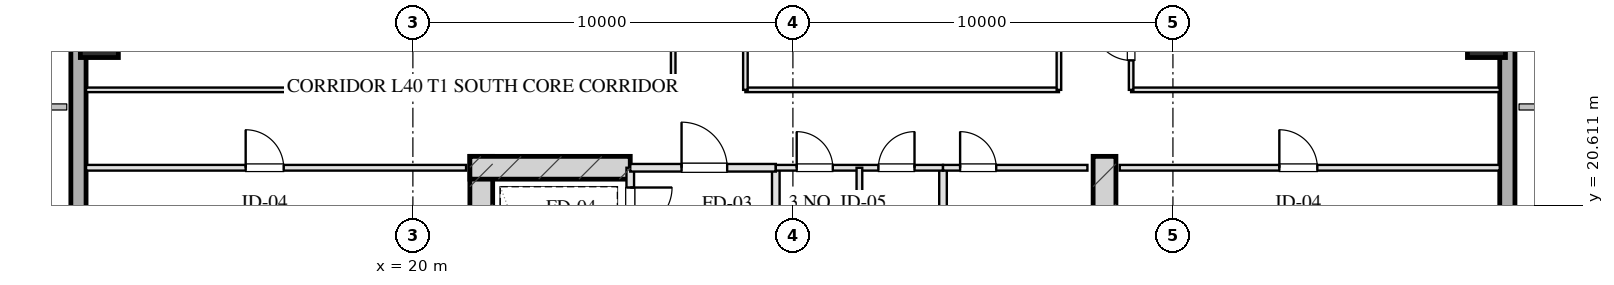
"""IFC4 building model, lengths in metres.
Left out: names, types, materials, properties, quantities, classifications, styles, units other than length and angle.
Written with IfcOpenShell. Run it as: python <this file> out.ifc"""

import sys

from ifc_helpers import new_model, si_unit, direction, frame, frame_2d, origin, origin_2d, place, context, subcontext, project, spatial, rectangle, hollow_rectangle, extrude, element, fill, save


model = new_model("IFC4")
c1 = context("Model", 3, precision=1e-05, world=origin(), true_north=direction((0.0, 1.0)))
c2 = subcontext(c1, "Body", "Model", "MODEL_VIEW")
j1 = project(units=[si_unit("LENGTHUNIT", "METRE"), si_unit("PLANEANGLEUNIT", "RADIAN")], contexts=[c1])
p1 = place(None, origin())
s1 = spatial("IfcSite", under=j1, at=p1, CompositionType="ELEMENT")
p2 = place(p1, origin())
s2 = spatial("IfcBuilding", under=s1, at=p2, CompositionType="ELEMENT")
p3 = place(p2, frame((0.0, 0.0, 152.95)))
s3 = spatial("IfcBuildingStorey", under=s2, at=p3, CompositionType="ELEMENT", Elevation=152.95)
for number, where, z_axis, x_axis in (
    (1, (21.8, 21.9, 0.0), (0.0, 0.0, 1.0), (0.0, -1.0, 0.0)),
    (2, (38.2, 21.9, 0.0), (0.0, 0.0, 1.0), (0.0, -1.0, 0.0)),
):
    element("IfcWall", number, at=place(p3, frame(where, z_axis=z_axis, x_axis=x_axis)), inside=s3, PredefinedType="SHEAR", context=c2, shape_type="SweptSolid", body=[
        extrude(rectangle(XDim=9.48, YDim=0.6, at=frame_2d((4.74, 0.0))), origin(), (0.0, 0.0, 1.0), 3.45),
    ])
p4 = place(p3, frame((21.5, 21.6, 0.0), z_axis=(0.0, 0.0, 1.0), x_axis=(1.0, 0.0, 0.0)))
e3 = element("IfcWall", 3, at=p4, inside=s3, PredefinedType="SHEAR", context=c2, shape_type="SweptSolid", body=[
    extrude(rectangle(XDim=4.22, YDim=0.6, at=frame_2d((2.11, 0.0))), origin(), (0.0, 0.0, 1.0), 3.45),
])
for number, where, z_axis, x_axis in (
    (4, (11.75, 25.0, 0.0), (0.0, 0.0, 1.0), (1.0, 0.0, 0.0)),
    (5, (48.25, 25.0, 0.0), (0.0, 0.0, 1.0), (1.0, 0.0, 0.0)),
):
    element("IfcColumn", number, at=place(p3, frame(where, z_axis=z_axis, x_axis=x_axis)), inside=s3, PredefinedType="COLUMN", context=c2, shape_type="SweptSolid", body=[
        extrude(hollow_rectangle(XDim=1.0, YDim=1.0, WallThickness=0.036, at=origin_2d()), origin(), (0.0, 0.0, 1.0), 3.451),
    ])
p5 = place(p3, frame((11.2, 9.0, 0.0), z_axis=(0.0, 0.0, 1.0), x_axis=(0.0, 1.0, 0.0)))
e6 = element("IfcWall", 6, at=p5, inside=s3, PredefinedType="SOLIDWALL", context=c2, shape_type="SweptSolid", body=[
    extrude(rectangle(XDim=50.0, YDim=0.4, at=frame_2d((25.0, 0.0))), origin(), (0.0, 0.0, 1.0), 2.61),
])
p6 = place(p5, frame((30.275, 0.0, 0.75)))
e7 = element("IfcOpeningElement", 7, at=p6, cuts=e6, PredefinedType="OPENING", context=c2, shape_type="SweptSolid", body=[
    extrude(rectangle(XDim=2.25, YDim=1.46, at=frame_2d((1.125, 0.73))), frame((0.0, 0.21, 0.0), z_axis=(0.0, -1.0, 0.0), x_axis=(1.0, 0.0, 0.0)), (0.0, 0.0, 1.0), 0.42),
])
p7 = place(p5, frame((18.65, 0.0, 0.0)))
e8 = element("IfcOpeningElement", 8, at=p7, cuts=e6, PredefinedType="OPENING", context=c2, shape_type="SweptSolid", body=[
    extrude(rectangle(XDim=1.1, YDim=2.15, at=frame_2d((0.55, 1.075))), frame((0.0, 0.21, 0.0), z_axis=(0.0, -1.0, 0.0), x_axis=(1.0, 0.0, 0.0)), (0.0, 0.0, 1.0), 0.42),
])
p8 = place(p3, frame((48.8, 59.0, 0.0), z_axis=(0.0, 0.0, 1.0), x_axis=(0.0, -1.0, 0.0)))
e9 = element("IfcWall", 9, at=p8, inside=s3, PredefinedType="SOLIDWALL", context=c2, shape_type="SweptSolid", body=[
    extrude(rectangle(XDim=50.0, YDim=0.4, at=frame_2d((25.0, 0.0))), origin(), (0.0, 0.0, 1.0), 2.61),
])
p9 = place(p8, frame((30.25, 0.0, 0.0)))
e10 = element("IfcOpeningElement", 10, at=p9, cuts=e9, PredefinedType="OPENING", context=c2, shape_type="SweptSolid", body=[
    extrude(rectangle(XDim=1.1, YDim=2.15, at=frame_2d((0.55, 1.075))), frame((0.0, 0.21, 0.0), z_axis=(0.0, -1.0, 0.0), x_axis=(1.0, 0.0, 0.0)), (0.0, 0.0, 1.0), 0.42),
])
p10 = place(p3, frame((25.72, 21.6, 0.0), z_axis=(0.0, 0.0, 1.0), x_axis=(0.0, -1.0, 0.0)))
e11 = element("IfcWall", 11, at=p10, inside=s3, PredefinedType="PARTITIONING", context=c2, shape_type="SweptSolid", body=[
    extrude(rectangle(XDim=1.9, YDim=0.2, at=frame_2d((0.95, 0.0))), origin(), (0.0, 0.0, 1.0), 3.175),
])
p11 = place(p10, frame((0.52, 0.0, 0.0)))
e12 = element("IfcOpeningElement", 12, at=p11, cuts=e11, PredefinedType="OPENING", context=c2, shape_type="SweptSolid", body=[
    extrude(rectangle(XDim=1.1, YDim=2.05, at=frame_2d((0.55, 1.025))), frame((0.0, 0.11, 0.0), z_axis=(0.0, -1.0, 0.0), x_axis=(1.0, 0.0, 0.0)), (0.0, 0.0, 1.0), 0.22),
])
p12 = place(p3, frame((29.55, 21.6, 0.0), z_axis=(0.0, 0.0, 1.0), x_axis=(0.0, -1.0, 0.0)))
e13 = element("IfcWall", 13, at=p12, inside=s3, PredefinedType="PARTITIONING", context=c2, shape_type="SweptSolid", body=[
    extrude(rectangle(XDim=8.43, YDim=0.2, at=frame_2d((4.215, 0.0))), origin(), (0.0, 0.0, 1.0), 3.175),
])
p13 = place(p3, frame((25.72, 21.6, 0.0), z_axis=(0.0, 0.0, 1.0), x_axis=(1.0, 0.0, 0.0)))
e14 = element("IfcWall", 14, at=p13, inside=s3, PredefinedType="PARTITIONING", context=c2, shape_type="SweptSolid", body=[
    extrude(rectangle(XDim=3.83, YDim=0.2, at=frame_2d((1.915, 0.0))), origin(), (0.0, 0.0, 1.0), 3.175),
])
p14 = place(p13, frame((1.35, 0.0, 0.0)))
e15 = element("IfcOpeningElement", 15, at=p14, cuts=e14, PredefinedType="OPENING", context=c2, shape_type="SweptSolid", body=[
    extrude(rectangle(XDim=1.2, YDim=2.05, at=frame_2d((0.6, 1.025))), frame((0.0, 0.11, 0.0), z_axis=(0.0, -1.0, 0.0), x_axis=(1.0, 0.0, 0.0)), (0.0, 0.0, 1.0), 0.22),
])
p15 = place(p3, frame((33.95, 21.6, 0.0), z_axis=(0.0, 0.0, 1.0), x_axis=(0.0, -1.0, 0.0)))
e16 = element("IfcWall", 16, at=p15, inside=s3, PredefinedType="PARTITIONING", context=c2, shape_type="SweptSolid", body=[
    extrude(rectangle(XDim=8.43, YDim=0.2, at=frame_2d((4.215, 0.0))), origin(), (0.0, 0.0, 1.0), 3.175),
])
p16 = place(p3, frame((29.55, 21.6, 0.0), z_axis=(0.0, 0.0, 1.0), x_axis=(1.0, 0.0, 0.0)))
e17 = element("IfcWall", 17, at=p16, inside=s3, PredefinedType="PARTITIONING", context=c2, shape_type="SweptSolid", body=[
    extrude(rectangle(XDim=4.4, YDim=0.15, at=frame_2d((2.2, 0.0))), origin(), (0.0, 0.0, 1.0), 3.175),
])
p17 = place(p16, frame((0.55, 0.0, 0.0)))
e18 = element("IfcOpeningElement", 18, at=p17, cuts=e17, PredefinedType="OPENING", context=c2, shape_type="SweptSolid", body=[
    extrude(rectangle(XDim=0.95, YDim=2.05, at=frame_2d((0.475, 1.025))), frame((0.0, 0.085, 0.0), z_axis=(0.0, -1.0, 0.0), x_axis=(1.0, 0.0, 0.0)), (0.0, 0.0, 1.0), 0.17),
])
p18 = place(p16, frame((2.7, 0.0, 0.0)))
e19 = element("IfcOpeningElement", 19, at=p18, cuts=e17, PredefinedType="OPENING", context=c2, shape_type="SweptSolid", body=[
    extrude(rectangle(XDim=0.95, YDim=2.05, at=frame_2d((0.475, 1.025))), frame((0.0, 0.085, 0.0), z_axis=(0.0, -1.0, 0.0), x_axis=(1.0, 0.0, 0.0)), (0.0, 0.0, 1.0), 0.17),
])
p19 = place(p3, frame((31.75, 21.6, 0.0), z_axis=(0.0, 0.0, 1.0), x_axis=(0.0, -1.0, 0.0)))
e20 = element("IfcWall", 20, at=p19, inside=s3, PredefinedType="PARTITIONING", context=c2, shape_type="SweptSolid", body=[
    extrude(rectangle(XDim=8.43, YDim=0.15, at=frame_2d((4.215, 0.0))), origin(), (0.0, 0.0, 1.0), 3.175),
])
p20 = place(p3, frame((33.95, 21.6, 0.0), z_axis=(0.0, 0.0, 1.0), x_axis=(1.0, 0.0, 0.0)))
e21 = element("IfcWall", 21, at=p20, inside=s3, PredefinedType="PARTITIONING", context=c2, shape_type="SweptSolid", body=[
    extrude(rectangle(XDim=3.8, YDim=0.15, at=frame_2d((1.9, 0.0))), origin(), (0.0, 0.0, 1.0), 3.175),
])
p21 = place(p20, frame((0.45, 0.0, 0.0)))
e22 = element("IfcOpeningElement", 22, at=p21, cuts=e21, PredefinedType="OPENING", context=c2, shape_type="SweptSolid", body=[
    extrude(rectangle(XDim=0.95, YDim=2.05, at=frame_2d((0.475, 1.025))), frame((0.0, 0.085, 0.0), z_axis=(0.0, -1.0, 0.0), x_axis=(1.0, 0.0, 0.0)), (0.0, 0.0, 1.0), 0.17),
])
p22 = place(p3, frame((11.4, 21.6, 0.0), z_axis=(0.0, 0.0, 1.0), x_axis=(1.0, 0.0, 0.0)))
e23 = element("IfcWall", 23, at=p22, inside=s3, PredefinedType="PARTITIONING", context=c2, shape_type="SweptSolid", body=[
    extrude(rectangle(XDim=10.0, YDim=0.15, at=frame_2d((5.0, 0.0))), origin(), (0.0, 0.0, 1.0), 3.175),
])
p23 = place(p22, frame((4.2, 0.0, 0.0)))
e24 = element("IfcOpeningElement", 24, at=p23, cuts=e23, PredefinedType="OPENING", context=c2, shape_type="SweptSolid", body=[
    extrude(rectangle(XDim=1.0, YDim=2.05, at=frame_2d((0.5, 1.025))), frame((0.0, 0.085, 0.0), z_axis=(0.0, -1.0, 0.0), x_axis=(1.0, 0.0, 0.0)), (0.0, 0.0, 1.0), 0.17),
])
p24 = place(p3, frame((38.6, 21.6, 0.0), z_axis=(0.0, 0.0, 1.0), x_axis=(1.0, 0.0, 0.0)))
e25 = element("IfcWall", 25, at=p24, inside=s3, PredefinedType="PARTITIONING", context=c2, shape_type="SweptSolid", body=[
    extrude(rectangle(XDim=10.0, YDim=0.15, at=frame_2d((5.0, 0.0))), origin(), (0.0, 0.0, 1.0), 3.175),
])
p25 = place(p24, frame((4.2, 0.0, 0.0)))
e26 = element("IfcOpeningElement", 26, at=p25, cuts=e25, PredefinedType="OPENING", context=c2, shape_type="SweptSolid", body=[
    extrude(rectangle(XDim=1.0, YDim=2.05, at=frame_2d((0.5, 1.025))), frame((0.0, 0.085, 0.0), z_axis=(0.0, -1.0, 0.0), x_axis=(1.0, 0.0, 0.0)), (0.0, 0.0, 1.0), 0.17),
])
p26 = place(p3, frame((11.4, 23.65, 0.0), z_axis=(0.0, 0.0, 1.0), x_axis=(1.0, 0.0, 0.0)))
e27 = element("IfcWall", 27, at=p26, inside=s3, PredefinedType="PARTITIONING", context=c2, shape_type="SweptSolid", body=[
    extrude(rectangle(XDim=15.45, YDim=0.12, at=frame_2d((7.725, 0.0))), origin(), (0.0, 0.0, 1.0), 3.175),
])
p27 = place(p3, frame((28.75, 23.65, 0.0), z_axis=(0.0, 0.0, 1.0), x_axis=(1.0, 0.0, 0.0)))
e28 = element("IfcWall", 28, at=p27, inside=s3, PredefinedType="PARTITIONING", context=c2, shape_type="SweptSolid", body=[
    extrude(rectangle(XDim=8.25, YDim=0.12, at=frame_2d((4.125, 0.0))), origin(), (0.0, 0.0, 1.0), 3.175),
])
p28 = place(p3, frame((38.9, 23.65, 0.0), z_axis=(0.0, 0.0, 1.0), x_axis=(1.0, 0.0, 0.0)))
e29 = element("IfcWall", 29, at=p28, inside=s3, PredefinedType="PARTITIONING", context=c2, shape_type="SweptSolid", body=[
    extrude(rectangle(XDim=9.7, YDim=0.12, at=frame_2d((4.85, 0.0))), origin(), (0.0, 0.0, 1.0), 3.175),
])
p29 = place(p3, frame((26.85, 23.65, 0.0), z_axis=(0.0, 0.0, 1.0), x_axis=(0.0, 1.0, 0.0)))
e30 = element("IfcWall", 30, at=p29, inside=s3, PredefinedType="PARTITIONING", context=c2, shape_type="SweptSolid", body=[
    extrude(rectangle(XDim=20.7, YDim=0.12, at=frame_2d((10.35, 0.0))), origin(), (0.0, 0.0, 1.0), 3.175),
])
p30 = place(p29, frame((2.675, 0.0, 0.0)))
e31 = element("IfcOpeningElement", 31, at=p30, cuts=e30, PredefinedType="OPENING", context=c2, shape_type="SweptSolid", body=[
    extrude(rectangle(XDim=1.0, YDim=2.05, at=frame_2d((0.5, 1.025))), frame((0.0, 0.07, 0.0), z_axis=(0.0, -1.0, 0.0), x_axis=(1.0, 0.0, 0.0)), (0.0, 0.0, 1.0), 0.14),
])
p31 = place(p29, frame((9.85, 0.0, 0.0)))
e32 = element("IfcOpeningElement", 32, at=p31, cuts=e30, PredefinedType="OPENING", context=c2, shape_type="SweptSolid", body=[
    extrude(rectangle(XDim=1.05, YDim=2.05, at=frame_2d((0.525, 1.025))), frame((0.0, 0.07, 0.0), z_axis=(0.0, -1.0, 0.0), x_axis=(1.0, 0.0, 0.0)), (0.0, 0.0, 1.0), 0.14),
])
p32 = place(p29, frame((17.025, 0.0, 0.0)))
e33 = element("IfcOpeningElement", 33, at=p32, cuts=e30, PredefinedType="OPENING", context=c2, shape_type="SweptSolid", body=[
    extrude(rectangle(XDim=1.0, YDim=2.05, at=frame_2d((0.5, 1.025))), frame((0.0, 0.07, 0.0), z_axis=(0.0, -1.0, 0.0), x_axis=(1.0, 0.0, 0.0)), (0.0, 0.0, 1.0), 0.14),
])
p33 = place(p3, frame((28.75, 23.65, 0.0), z_axis=(0.0, 0.0, 1.0), x_axis=(0.0, 1.0, 0.0)))
e34 = element("IfcWall", 34, at=p33, inside=s3, PredefinedType="PARTITIONING", context=c2, shape_type="SweptSolid", body=[
    extrude(rectangle(XDim=20.7, YDim=0.12, at=frame_2d((10.35, 0.0))), origin(), (0.0, 0.0, 1.0), 3.175),
])
p34 = place(p33, frame((9.936, 0.0, 0.0)))
e35 = element("IfcOpeningElement", 35, at=p34, cuts=e34, PredefinedType="OPENING", context=c2, shape_type="SweptSolid", body=[
    extrude(rectangle(XDim=1.1, YDim=2.05, at=frame_2d((0.55, 1.025))), frame((0.0, 0.07, 0.0), z_axis=(0.0, -1.0, 0.0), x_axis=(1.0, 0.0, 0.0)), (0.0, 0.0, 1.0), 0.14),
])
p35 = place(p3, frame((37.0, 23.65, 0.0), z_axis=(0.0, 0.0, 1.0), x_axis=(0.0, 1.0, 0.0)))
e36 = element("IfcWall", 36, at=p35, inside=s3, PredefinedType="PARTITIONING", context=c2, shape_type="SweptSolid", body=[
    extrude(rectangle(XDim=20.7, YDim=0.12, at=frame_2d((10.35, 0.0))), origin(), (0.0, 0.0, 1.0), 3.175),
])
p36 = place(p3, frame((38.9, 23.65, 0.0), z_axis=(0.0, 0.0, 1.0), x_axis=(0.0, 1.0, 0.0)))
e37 = element("IfcWall", 37, at=p36, inside=s3, PredefinedType="PARTITIONING", context=c2, shape_type="SweptSolid", body=[
    extrude(rectangle(XDim=20.7, YDim=0.12, at=frame_2d((10.35, 0.0))), origin(), (0.0, 0.0, 1.0), 3.175),
])
p37 = place(p36, frame((0.775, 0.0, 0.0)))
e38 = element("IfcOpeningElement", 38, at=p37, cuts=e37, PredefinedType="OPENING", context=c2, shape_type="SweptSolid", body=[
    extrude(rectangle(XDim=1.0, YDim=2.05, at=frame_2d((0.5, 1.025))), frame((0.0, 0.07, 0.0), z_axis=(0.0, -1.0, 0.0), x_axis=(1.0, 0.0, 0.0)), (0.0, 0.0, 1.0), 0.14),
])
p38 = place(p36, frame((3.95, 0.0, 0.0)))
e39 = element("IfcOpeningElement", 39, at=p38, cuts=e37, PredefinedType="OPENING", context=c2, shape_type="SweptSolid", body=[
    extrude(rectangle(XDim=1.0, YDim=2.05, at=frame_2d((0.5, 1.025))), frame((0.0, 0.07, 0.0), z_axis=(0.0, -1.0, 0.0), x_axis=(1.0, 0.0, 0.0)), (0.0, 0.0, 1.0), 0.14),
])
p39 = place(p36, frame((8.45, 0.0, 0.0)))
e40 = element("IfcOpeningElement", 40, at=p39, cuts=e37, PredefinedType="OPENING", context=c2, shape_type="SweptSolid", body=[
    extrude(rectangle(XDim=1.0, YDim=2.05, at=frame_2d((0.5, 1.025))), frame((0.0, 0.07, 0.0), z_axis=(0.0, -1.0, 0.0), x_axis=(1.0, 0.0, 0.0)), (0.0, 0.0, 1.0), 0.14),
])
p40 = place(p36, frame((12.95, 0.0, 0.0)))
e41 = element("IfcOpeningElement", 41, at=p40, cuts=e37, PredefinedType="OPENING", context=c2, shape_type="SweptSolid", body=[
    extrude(rectangle(XDim=1.0, YDim=2.05, at=frame_2d((0.5, 1.025))), frame((0.0, 0.07, 0.0), z_axis=(0.0, -1.0, 0.0), x_axis=(1.0, 0.0, 0.0)), (0.0, 0.0, 1.0), 0.14),
])
p41 = place(p36, frame((16.299, 0.0, 0.0)))
e42 = element("IfcOpeningElement", 42, at=p41, cuts=e37, PredefinedType="OPENING", context=c2, shape_type="SweptSolid", body=[
    extrude(rectangle(XDim=1.05, YDim=2.05, at=frame_2d((0.525, 1.025))), frame((0.0, 0.07, 0.0), z_axis=(0.0, -1.0, 0.0), x_axis=(1.0, 0.0, 0.0)), (0.0, 0.0, 1.0), 0.14),
])
p42 = place(p36, frame((18.974, 0.0, 0.0)))
e43 = element("IfcOpeningElement", 43, at=p42, cuts=e37, PredefinedType="OPENING", context=c2, shape_type="SweptSolid", body=[
    extrude(rectangle(XDim=1.0, YDim=2.05, at=frame_2d((0.5, 1.025))), frame((0.0, 0.07, 0.0), z_axis=(0.0, -1.0, 0.0), x_axis=(1.0, 0.0, 0.0)), (0.0, 0.0, 1.0), 0.14),
])
p43 = place(p11, origin())
e44 = element("IfcDoor", 44, at=p43, inside=s3, OperationType="SINGLE_SWING_LEFT", PredefinedType="DOOR", context=c2, shape_type="SweptSolid", body=[
    extrude(rectangle(XDim=1.1, YDim=2.05, at=frame_2d((0.55, 1.025))), frame((0.0, 0.025, 0.0), z_axis=(0.0, -1.0, 0.0), x_axis=(1.0, 0.0, 0.0)), (0.0, 0.0, 1.0), 0.05),
])
fill(e12, e44)
p44 = place(p14, origin())
e45 = element("IfcDoor", 45, at=p44, inside=s3, OperationType="SINGLE_SWING_LEFT", PredefinedType="DOOR", context=c2, shape_type="SweptSolid", body=[
    extrude(rectangle(XDim=1.2, YDim=2.05, at=frame_2d((0.6, 1.025))), frame((0.0, 0.025, 0.0), z_axis=(0.0, -1.0, 0.0), x_axis=(1.0, 0.0, 0.0)), (0.0, 0.0, 1.0), 0.05),
])
fill(e15, e45)
p45 = place(p17, origin())
e46 = element("IfcDoor", 46, at=p45, inside=s3, OperationType="SINGLE_SWING_LEFT", PredefinedType="DOOR", context=c2, shape_type="SweptSolid", body=[
    extrude(rectangle(XDim=0.95, YDim=2.05, at=frame_2d((0.475, 1.025))), frame((0.0, 0.025, 0.0), z_axis=(0.0, -1.0, 0.0), x_axis=(1.0, 0.0, 0.0)), (0.0, 0.0, 1.0), 0.05),
])
fill(e18, e46)
p46 = place(p18, origin())
e47 = element("IfcDoor", 47, at=p46, inside=s3, OperationType="SINGLE_SWING_RIGHT", PredefinedType="DOOR", context=c2, shape_type="SweptSolid", body=[
    extrude(rectangle(XDim=0.95, YDim=2.05, at=frame_2d((0.475, 1.025))), frame((0.0, 0.025, 0.0), z_axis=(0.0, -1.0, 0.0), x_axis=(1.0, 0.0, 0.0)), (0.0, 0.0, 1.0), 0.05),
])
fill(e19, e47)
p47 = place(p21, origin())
e48 = element("IfcDoor", 48, at=p47, inside=s3, OperationType="SINGLE_SWING_LEFT", PredefinedType="DOOR", context=c2, shape_type="SweptSolid", body=[
    extrude(rectangle(XDim=0.95, YDim=2.05, at=frame_2d((0.475, 1.025))), frame((0.0, 0.025, 0.0), z_axis=(0.0, -1.0, 0.0), x_axis=(1.0, 0.0, 0.0)), (0.0, 0.0, 1.0), 0.05),
])
fill(e22, e48)
p48 = place(p23, origin())
e49 = element("IfcDoor", 49, at=p48, inside=s3, OperationType="SINGLE_SWING_LEFT", PredefinedType="DOOR", context=c2, shape_type="SweptSolid", body=[
    extrude(rectangle(XDim=1.0, YDim=2.05, at=frame_2d((0.5, 1.025))), frame((0.0, 0.025, 0.0), z_axis=(0.0, -1.0, 0.0), x_axis=(1.0, 0.0, 0.0)), (0.0, 0.0, 1.0), 0.05),
])
fill(e24, e49)
p49 = place(p25, origin())
e50 = element("IfcDoor", 50, at=p49, inside=s3, OperationType="SINGLE_SWING_LEFT", PredefinedType="DOOR", context=c2, shape_type="SweptSolid", body=[
    extrude(rectangle(XDim=1.0, YDim=2.05, at=frame_2d((0.5, 1.025))), frame((0.0, 0.025, 0.0), z_axis=(0.0, -1.0, 0.0), x_axis=(1.0, 0.0, 0.0)), (0.0, 0.0, 1.0), 0.05),
])
fill(e26, e50)
p50 = place(p37, origin())
e51 = element("IfcDoor", 51, at=p50, inside=s3, OperationType="SINGLE_SWING_RIGHT", PredefinedType="DOOR", context=c2, shape_type="SweptSolid", body=[
    extrude(rectangle(XDim=1.0, YDim=2.05, at=frame_2d((0.5, 1.025))), frame((0.0, 0.025, 0.0), z_axis=(0.0, -1.0, 0.0), x_axis=(1.0, 0.0, 0.0)), (0.0, 0.0, 1.0), 0.05),
])
fill(e38, e51)
save(model, sys.argv[1])
